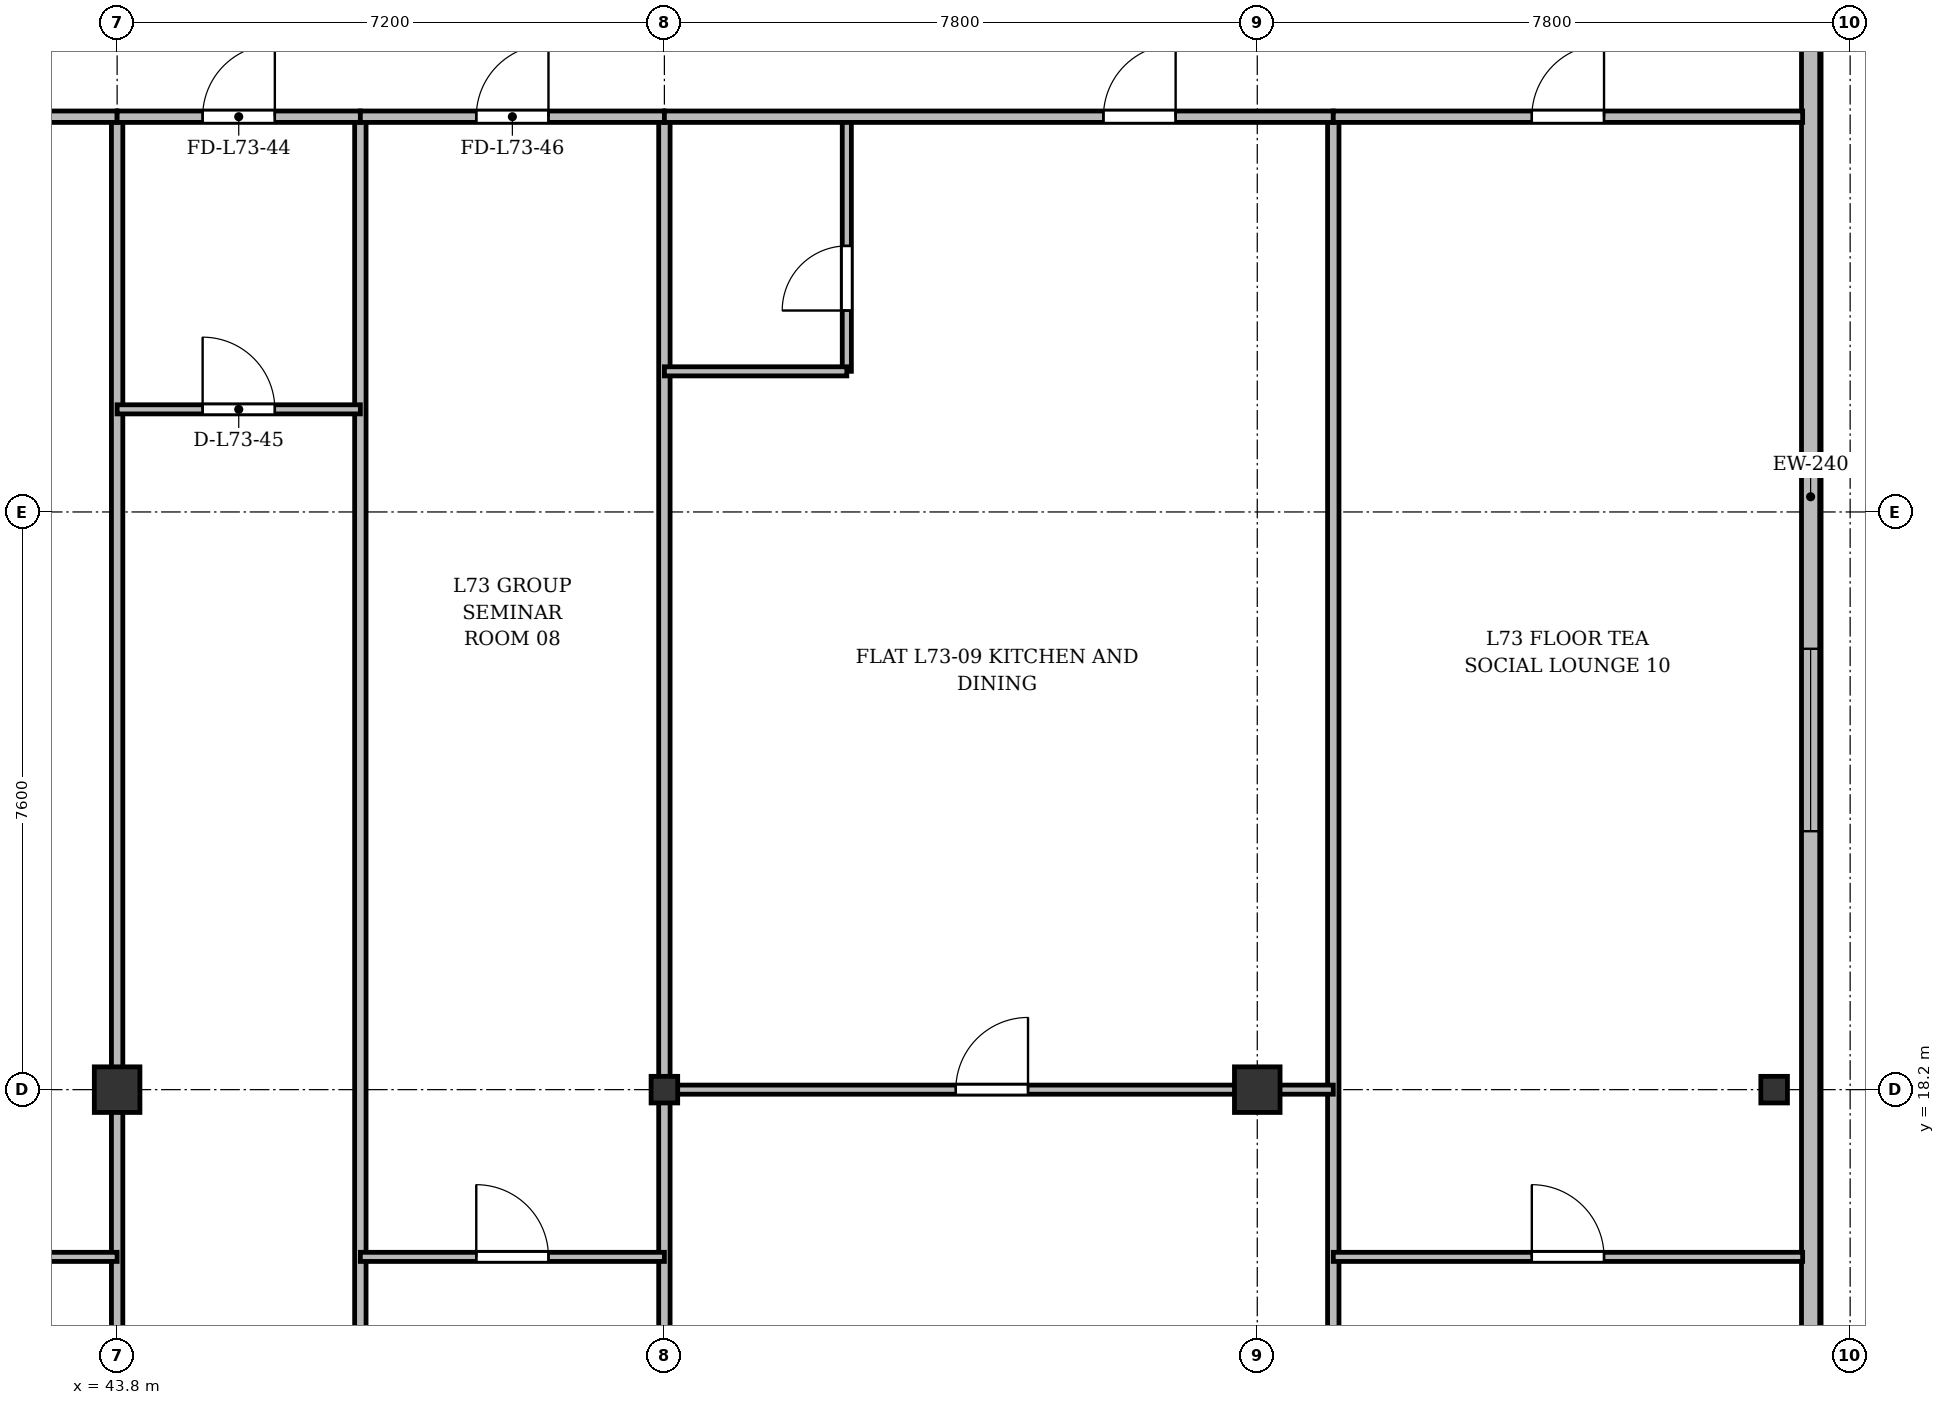
"""IFC4 building model, lengths in metres.
Left out: names, types, materials, properties, quantities, classifications, styles, units other than length and angle.
Written with IfcOpenShell. Run it as: python <this file> out.ifc"""

import sys

from ifc_helpers import new_model, si_unit, direction, frame, frame_2d, origin, origin_2d, place, context, subcontext, project, spatial, rectangle, i_section, extrude, source, transform, mapped, element, fill, save


model = new_model("IFC4")
c1 = context("Model", 3, precision=1e-05, world=origin(), true_north=direction((0.0, 1.0)))
c2 = subcontext(c1, "Body", "Model", "MODEL_VIEW")
j1 = project(units=[si_unit("LENGTHUNIT", "METRE"), si_unit("PLANEANGLEUNIT", "RADIAN")], contexts=[c1])
p1 = place(None, origin())
s1 = spatial("IfcSite", under=j1, at=p1, CompositionType="ELEMENT")
p2 = place(p1, origin())
s2 = spatial("IfcBuilding", under=s1, at=p2, CompositionType="ELEMENT")
p3 = place(p2, frame((0.0, 0.0, 281.1)))
s3 = spatial("IfcBuildingStorey", under=s2, at=p3, CompositionType="ELEMENT", Elevation=281.1)
m1 = source(origin(), c2, "Body", "SweptSolid", [
    extrude(rectangle(XDim=0.6, YDim=0.6, at=origin_2d()), origin(), (0.0, 0.0, 1.0), 3.6),
])
p4 = place(p3, frame((43.8, 18.2, 0.0), z_axis=(0.0, 0.0, 1.0), x_axis=(1.0, 0.0, 0.0)))
e1 = element("IfcColumn", 1, at=p4, inside=s3, PredefinedType="COLUMN", context=c2, shape_type="MappedRepresentation", body=[
    mapped(m1, transform((0.0, 0.0, 0.0), x_axis=(1.0, 0.0, 0.0), y_axis=(0.0, 1.0, 0.0), z_axis=(0.0, 0.0, 1.0), scale=1.0)),
])
m2 = source(origin(), c2, "Body", "SweptSolid", [
    extrude(i_section(OverallWidth=0.35, OverallDepth=0.35, WebThickness=0.018, FlangeThickness=0.028, at=origin_2d()), origin(), (0.0, 0.0, 1.0), 3.6),
])
p5 = place(p3, frame((51.0, 18.2, 0.0), z_axis=(0.0, 0.0, 1.0), x_axis=(1.0, 0.0, 0.0)))
e2 = element("IfcColumn", 2, at=p5, inside=s3, PredefinedType="COLUMN", context=c2, shape_type="MappedRepresentation", body=[
    mapped(m2, transform((0.0, 0.0, 0.0), x_axis=(1.0, 0.0, 0.0), y_axis=(0.0, 1.0, 0.0), z_axis=(0.0, 0.0, 1.0), scale=1.0)),
])
p6 = place(p3, frame((58.8, 18.2, 0.0), z_axis=(0.0, 0.0, 1.0), x_axis=(1.0, 0.0, 0.0)))
e3 = element("IfcColumn", 3, at=p6, inside=s3, PredefinedType="COLUMN", context=c2, shape_type="MappedRepresentation", body=[
    mapped(m1, transform((0.0, 0.0, 0.0), x_axis=(1.0, 0.0, 0.0), y_axis=(0.0, 1.0, 0.0), z_axis=(0.0, 0.0, 1.0), scale=1.0)),
])
p7 = place(p3, frame((65.6, 18.2, 0.0), z_axis=(0.0, 0.0, 1.0), x_axis=(1.0, 0.0, 0.0)))
e4 = element("IfcColumn", 4, at=p7, inside=s3, PredefinedType="COLUMN", context=c2, shape_type="MappedRepresentation", body=[
    mapped(m2, transform((0.0, 0.0, 0.0), x_axis=(1.0, 0.0, 0.0), y_axis=(0.0, 1.0, 0.0), z_axis=(0.0, 0.0, 1.0), scale=1.0)),
])
p8 = place(p3, frame((66.08, 45.5, 0.0), z_axis=(0.0, 0.0, 1.0), x_axis=(0.0, -1.0, 0.0)))
e5 = element("IfcWall", 5, at=p8, inside=s3, PredefinedType="SOLIDWALL", context=c2, shape_type="SweptSolid", body=[
    extrude(rectangle(XDim=39.0, YDim=0.24, at=frame_2d((19.5, 0.0))), origin(), (0.0, 0.0, 1.0), 3.37),
])
p9 = place(p8, frame((36.35, 0.0, 0.92)))
e6 = element("IfcOpeningElement", 6, at=p9, cuts=e5, PredefinedType="OPENING", context=c2, shape_type="SweptSolid", body=[
    extrude(rectangle(XDim=1.2, YDim=1.65, at=frame_2d((0.6, 0.825))), frame((0.0, 0.13, 0.0), z_axis=(0.0, -1.0, 0.0), x_axis=(1.0, 0.0, 0.0)), (0.0, 0.0, 1.0), 0.26),
])
p10 = place(p8, frame((32.9, 0.0, 0.92)))
e7 = element("IfcOpeningElement", 7, at=p10, cuts=e5, PredefinedType="OPENING", context=c2, shape_type="SweptSolid", body=[
    extrude(rectangle(XDim=2.4, YDim=2.1, at=frame_2d((1.2, 1.05))), frame((0.0, 0.13, 0.0), z_axis=(0.0, -1.0, 0.0), x_axis=(1.0, 0.0, 0.0)), (0.0, 0.0, 1.0), 0.26),
])
p11 = place(p8, frame((21.5, 0.0, 0.92)))
e8 = element("IfcOpeningElement", 8, at=p11, cuts=e5, PredefinedType="OPENING", context=c2, shape_type="SweptSolid", body=[
    extrude(rectangle(XDim=2.4, YDim=2.1, at=frame_2d((1.2, 1.05))), frame((0.0, 0.13, 0.0), z_axis=(0.0, -1.0, 0.0), x_axis=(1.0, 0.0, 0.0)), (0.0, 0.0, 1.0), 0.26),
])
p12 = place(p8, frame((7.5, 0.0, 0.92)))
e9 = element("IfcOpeningElement", 9, at=p12, cuts=e5, PredefinedType="OPENING", context=c2, shape_type="SweptSolid", body=[
    extrude(rectangle(XDim=2.4, YDim=2.1, at=frame_2d((1.2, 1.05))), frame((0.0, 0.13, 0.0), z_axis=(0.0, -1.0, 0.0), x_axis=(1.0, 0.0, 0.0)), (0.0, 0.0, 1.0), 0.26),
])
p13 = place(p8, frame((1.15, 0.0, 0.92)))
e10 = element("IfcOpeningElement", 10, at=p13, cuts=e5, PredefinedType="OPENING", context=c2, shape_type="SweptSolid", body=[
    extrude(rectangle(XDim=1.2, YDim=1.65, at=frame_2d((0.6, 0.825))), frame((0.0, 0.13, 0.0), z_axis=(0.0, -1.0, 0.0), x_axis=(1.0, 0.0, 0.0)), (0.0, 0.0, 1.0), 0.26),
])
p14 = place(p3, frame((43.8, 3.725, 0.0), z_axis=(0.0, 0.0, 1.0), x_axis=(0.0, 1.0, 0.0)))
e11 = element("IfcWall", 11, at=p14, inside=s3, PredefinedType="PARTITIONING", context=c2, shape_type="SweptSolid", body=[
    extrude(rectangle(XDim=27.275, YDim=0.15, at=frame_2d((13.637, 0.0))), origin(), (0.0, 0.0, 1.0), 2.87),
])
p15 = place(p3, frame((47.0, 3.725, 0.0), z_axis=(0.0, 0.0, 1.0), x_axis=(0.0, 1.0, 0.0)))
e12 = element("IfcWall", 12, at=p15, inside=s3, PredefinedType="PARTITIONING", context=c2, shape_type="SweptSolid", body=[
    extrude(rectangle(XDim=27.275, YDim=0.15, at=frame_2d((13.637, 0.0))), origin(), (0.0, 0.0, 1.0), 2.92),
])
p16 = place(p3, frame((51.0, 3.725, 0.0), z_axis=(0.0, 0.0, 1.0), x_axis=(0.0, 1.0, 0.0)))
e13 = element("IfcWall", 13, at=p16, inside=s3, PredefinedType="PARTITIONING", context=c2, shape_type="SweptSolid", body=[
    extrude(rectangle(XDim=27.275, YDim=0.15, at=frame_2d((13.637, 0.0))), origin(), (0.0, 0.0, 1.0), 2.87),
])
p17 = place(p3, frame((59.8, 3.725, 0.0), z_axis=(0.0, 0.0, 1.0), x_axis=(0.0, 1.0, 0.0)))
e14 = element("IfcWall", 14, at=p17, inside=s3, PredefinedType="PARTITIONING", context=c2, shape_type="SweptSolid", body=[
    extrude(rectangle(XDim=27.275, YDim=0.15, at=frame_2d((13.637, 0.0))), origin(), (0.0, 0.0, 1.0), 2.92),
])
p18 = place(p3, frame((38.2, 31.0, 0.0), z_axis=(0.0, 0.0, 1.0), x_axis=(1.0, 0.0, 0.0)))
e15 = element("IfcWall", 15, at=p18, inside=s3, PredefinedType="PARTITIONING", context=c2, shape_type="SweptSolid", body=[
    extrude(rectangle(XDim=5.6, YDim=0.15, at=frame_2d((2.8, 0.0))), origin(), (0.0, 0.0, 1.0), 2.87),
])
p19 = place(p18, frame((2.232, 0.0, 0.0)))
e16 = element("IfcOpeningElement", 16, at=p19, cuts=e15, PredefinedType="OPENING", context=c2, shape_type="SweptSolid", body=[
    extrude(rectangle(XDim=0.95, YDim=2.15, at=frame_2d((0.475, 1.075))), frame((0.0, 0.085, 0.0), z_axis=(0.0, -1.0, 0.0), x_axis=(1.0, 0.0, 0.0)), (0.0, 0.0, 1.0), 0.17),
])
p20 = place(p3, frame((38.2, 16.0, 0.0), z_axis=(0.0, 0.0, 1.0), x_axis=(1.0, 0.0, 0.0)))
e17 = element("IfcWall", 17, at=p20, inside=s3, PredefinedType="PARTITIONING", context=c2, shape_type="SweptSolid", body=[
    extrude(rectangle(XDim=5.6, YDim=0.12, at=frame_2d((2.8, 0.0))), origin(), (0.0, 0.0, 1.0), 2.87),
])
p21 = place(p20, frame((2.232, 0.0, 0.0)))
e18 = element("IfcOpeningElement", 18, at=p21, cuts=e17, PredefinedType="OPENING", context=c2, shape_type="SweptSolid", body=[
    extrude(rectangle(XDim=0.95, YDim=2.15, at=frame_2d((0.475, 1.075))), frame((0.0, 0.07, 0.0), z_axis=(0.0, -1.0, 0.0), x_axis=(1.0, 0.0, 0.0)), (0.0, 0.0, 1.0), 0.14),
])
p22 = place(p3, frame((43.8, 31.0, 0.0), z_axis=(0.0, 0.0, 1.0), x_axis=(1.0, 0.0, 0.0)))
e19 = element("IfcWall", 19, at=p22, inside=s3, PredefinedType="PARTITIONING", context=c2, shape_type="SweptSolid", body=[
    extrude(rectangle(XDim=3.2, YDim=0.15, at=frame_2d((1.6, 0.0))), origin(), (0.0, 0.0, 1.0), 2.87),
])
p23 = place(p22, frame((1.125, 0.0, 0.0)))
e20 = element("IfcOpeningElement", 20, at=p23, cuts=e19, PredefinedType="OPENING", context=c2, shape_type="SweptSolid", body=[
    extrude(rectangle(XDim=0.95, YDim=2.15, at=frame_2d((0.475, 1.075))), frame((0.0, 0.085, 0.0), z_axis=(0.0, -1.0, 0.0), x_axis=(1.0, 0.0, 0.0)), (0.0, 0.0, 1.0), 0.17),
])
p24 = place(p3, frame((43.8, 27.15, 0.0), z_axis=(0.0, 0.0, 1.0), x_axis=(1.0, 0.0, 0.0)))
e21 = element("IfcWall", 21, at=p24, inside=s3, PredefinedType="PARTITIONING", context=c2, shape_type="SweptSolid", body=[
    extrude(rectangle(XDim=3.2, YDim=0.12, at=frame_2d((1.6, 0.0))), origin(), (0.0, 0.0, 1.0), 2.87),
])
p25 = place(p24, frame((1.125, 0.0, 0.0)))
e22 = element("IfcOpeningElement", 22, at=p25, cuts=e21, PredefinedType="OPENING", context=c2, shape_type="SweptSolid", body=[
    extrude(rectangle(XDim=0.95, YDim=2.15, at=frame_2d((0.475, 1.075))), frame((0.0, 0.07, 0.0), z_axis=(0.0, -1.0, 0.0), x_axis=(1.0, 0.0, 0.0)), (0.0, 0.0, 1.0), 0.14),
])
p26 = place(p3, frame((47.0, 31.0, 0.0), z_axis=(0.0, 0.0, 1.0), x_axis=(1.0, 0.0, 0.0)))
e23 = element("IfcWall", 23, at=p26, inside=s3, PredefinedType="PARTITIONING", context=c2, shape_type="SweptSolid", body=[
    extrude(rectangle(XDim=4.0, YDim=0.15, at=frame_2d((2.0, 0.0))), origin(), (0.0, 0.0, 1.0), 2.87),
])
p27 = place(p26, frame((1.525, 0.0, 0.0)))
e24 = element("IfcOpeningElement", 24, at=p27, cuts=e23, PredefinedType="OPENING", context=c2, shape_type="SweptSolid", body=[
    extrude(rectangle(XDim=0.95, YDim=2.15, at=frame_2d((0.475, 1.075))), frame((0.0, 0.085, 0.0), z_axis=(0.0, -1.0, 0.0), x_axis=(1.0, 0.0, 0.0)), (0.0, 0.0, 1.0), 0.17),
])
p28 = place(p3, frame((47.0, 16.0, 0.0), z_axis=(0.0, 0.0, 1.0), x_axis=(1.0, 0.0, 0.0)))
e25 = element("IfcWall", 25, at=p28, inside=s3, PredefinedType="PARTITIONING", context=c2, shape_type="SweptSolid", body=[
    extrude(rectangle(XDim=4.0, YDim=0.12, at=frame_2d((2.0, 0.0))), origin(), (0.0, 0.0, 1.0), 2.87),
])
p29 = place(p28, frame((1.525, 0.0, 0.0)))
e26 = element("IfcOpeningElement", 26, at=p29, cuts=e25, PredefinedType="OPENING", context=c2, shape_type="SweptSolid", body=[
    extrude(rectangle(XDim=0.95, YDim=2.15, at=frame_2d((0.475, 1.075))), frame((0.0, 0.07, 0.0), z_axis=(0.0, -1.0, 0.0), x_axis=(1.0, 0.0, 0.0)), (0.0, 0.0, 1.0), 0.14),
])
p30 = place(p3, frame((51.0, 18.2, 0.0), z_axis=(0.0, 0.0, 1.0), x_axis=(1.0, 0.0, 0.0)))
e27 = element("IfcWall", 27, at=p30, inside=s3, PredefinedType="PARTITIONING", context=c2, shape_type="SweptSolid", body=[
    extrude(rectangle(XDim=8.8, YDim=0.12, at=frame_2d((4.4, 0.0))), origin(), (0.0, 0.0, 1.0), 2.92),
])
p31 = place(p30, frame((3.834, 0.0, 0.0)))
e28 = element("IfcOpeningElement", 28, at=p31, cuts=e27, PredefinedType="OPENING", context=c2, shape_type="SweptSolid", body=[
    extrude(rectangle(XDim=0.95, YDim=2.15, at=frame_2d((0.475, 1.075))), frame((0.0, 0.07, 0.0), z_axis=(0.0, -1.0, 0.0), x_axis=(1.0, 0.0, 0.0)), (0.0, 0.0, 1.0), 0.14),
])
p32 = place(p3, frame((53.4, 27.65, 0.0), z_axis=(0.0, 0.0, 1.0), x_axis=(0.0, 1.0, 0.0)))
e29 = element("IfcWall", 29, at=p32, inside=s3, PredefinedType="PARTITIONING", context=c2, shape_type="SweptSolid", body=[
    extrude(rectangle(XDim=3.35, YDim=0.12, at=frame_2d((1.675, 0.0))), origin(), (0.0, 0.0, 1.0), 3.37),
])
p33 = place(p32, frame((0.8, 0.0, 0.0)))
e30 = element("IfcOpeningElement", 30, at=p33, cuts=e29, PredefinedType="OPENING", context=c2, shape_type="SweptSolid", body=[
    extrude(rectangle(XDim=0.85, YDim=2.1, at=frame_2d((0.425, 1.05))), frame((0.0, 0.07, 0.0), z_axis=(0.0, -1.0, 0.0), x_axis=(1.0, 0.0, 0.0)), (0.0, 0.0, 1.0), 0.14),
])
p34 = place(p3, frame((51.0, 27.65, 0.0), z_axis=(0.0, 0.0, 1.0), x_axis=(1.0, 0.0, 0.0)))
e31 = element("IfcWall", 31, at=p34, inside=s3, PredefinedType="PARTITIONING", context=c2, shape_type="SweptSolid", body=[
    extrude(rectangle(XDim=2.4, YDim=0.12, at=frame_2d((1.2, 0.0))), origin(), (0.0, 0.0, 1.0), 2.87),
])
p35 = place(p3, frame((51.0, 31.0, 0.0), z_axis=(0.0, 0.0, 1.0), x_axis=(1.0, 0.0, 0.0)))
e32 = element("IfcWall", 32, at=p35, inside=s3, PredefinedType="PARTITIONING", context=c2, shape_type="SweptSolid", body=[
    extrude(rectangle(XDim=8.8, YDim=0.15, at=frame_2d((4.4, 0.0))), origin(), (0.0, 0.0, 1.0), 2.87),
])
p36 = place(p35, frame((5.776, 0.0, 0.0)))
e33 = element("IfcOpeningElement", 33, at=p36, cuts=e32, PredefinedType="OPENING", context=c2, shape_type="SweptSolid", body=[
    extrude(rectangle(XDim=0.95, YDim=2.15, at=frame_2d((0.475, 1.075))), frame((0.0, 0.085, 0.0), z_axis=(0.0, -1.0, 0.0), x_axis=(1.0, 0.0, 0.0)), (0.0, 0.0, 1.0), 0.17),
])
p37 = place(p3, frame((59.8, 31.0, 0.0), z_axis=(0.0, 0.0, 1.0), x_axis=(1.0, 0.0, 0.0)))
e34 = element("IfcWall", 34, at=p37, inside=s3, PredefinedType="PARTITIONING", context=c2, shape_type="SweptSolid", body=[
    extrude(rectangle(XDim=6.175, YDim=0.15, at=frame_2d((3.087, 0.0))), origin(), (0.0, 0.0, 1.0), 2.87),
])
p38 = place(p37, frame((2.612, 0.0, 0.0)))
e35 = element("IfcOpeningElement", 35, at=p38, cuts=e34, PredefinedType="OPENING", context=c2, shape_type="SweptSolid", body=[
    extrude(rectangle(XDim=0.95, YDim=2.15, at=frame_2d((0.475, 1.075))), frame((0.0, 0.085, 0.0), z_axis=(0.0, -1.0, 0.0), x_axis=(1.0, 0.0, 0.0)), (0.0, 0.0, 1.0), 0.17),
])
p39 = place(p3, frame((59.8, 16.0, 0.0), z_axis=(0.0, 0.0, 1.0), x_axis=(1.0, 0.0, 0.0)))
e36 = element("IfcWall", 36, at=p39, inside=s3, PredefinedType="PARTITIONING", context=c2, shape_type="SweptSolid", body=[
    extrude(rectangle(XDim=6.175, YDim=0.12, at=frame_2d((3.087, 0.0))), origin(), (0.0, 0.0, 1.0), 2.87),
])
p40 = place(p39, frame((2.612, 0.0, 0.0)))
e37 = element("IfcOpeningElement", 37, at=p40, cuts=e36, PredefinedType="OPENING", context=c2, shape_type="SweptSolid", body=[
    extrude(rectangle(XDim=0.95, YDim=2.15, at=frame_2d((0.475, 1.075))), frame((0.0, 0.07, 0.0), z_axis=(0.0, -1.0, 0.0), x_axis=(1.0, 0.0, 0.0)), (0.0, 0.0, 1.0), 0.14),
])
m3 = source(origin(), c2, "Body", "SweptSolid", [
    extrude(rectangle(XDim=2.4, YDim=2.1, at=frame_2d((1.2, 1.05))), frame((0.0, 0.03, 0.0), z_axis=(0.0, -1.0, 0.0), x_axis=(1.0, 0.0, 0.0)), (0.0, 0.0, 1.0), 0.06),
])
p41 = place(p11, origin())
e38 = element("IfcWindow", 38, at=p41, inside=s3, PartitioningType="SINGLE_PANEL", PredefinedType="WINDOW", context=c2, shape_type="MappedRepresentation", body=[
    mapped(m3, transform((0.0, 0.0, 0.0), x_axis=(1.0, 0.0, 0.0), y_axis=(0.0, 1.0, 0.0), z_axis=(0.0, 0.0, 1.0), scale=1.0)),
])
fill(e8, e38)
m4 = source(origin(), c2, "Body", "SweptSolid", [
    extrude(rectangle(XDim=0.95, YDim=2.15, at=frame_2d((0.475, 1.075))), frame((0.0, 0.025, 0.0), z_axis=(0.0, -1.0, 0.0), x_axis=(1.0, 0.0, 0.0)), (0.0, 0.0, 1.0), 0.05),
])
p42 = place(p23, origin())
e39 = element("IfcDoor", 39, at=p42, inside=s3, OperationType="SINGLE_SWING_RIGHT", PredefinedType="DOOR", context=c2, shape_type="MappedRepresentation", body=[
    mapped(m4, transform((0.0, 0.0, 0.0), x_axis=(1.0, 0.0, 0.0), y_axis=(0.0, 1.0, 0.0), z_axis=(0.0, 0.0, 1.0), scale=1.0)),
])
fill(e20, e39)
p43 = place(p25, origin())
e40 = element("IfcDoor", 40, at=p43, inside=s3, OperationType="SINGLE_SWING_LEFT", PredefinedType="DOOR", context=c2, shape_type="MappedRepresentation", body=[
    mapped(m4, transform((0.0, 0.0, 0.0), x_axis=(1.0, 0.0, 0.0), y_axis=(0.0, 1.0, 0.0), z_axis=(0.0, 0.0, 1.0), scale=1.0)),
])
fill(e22, e40)
p44 = place(p27, origin())
e41 = element("IfcDoor", 41, at=p44, inside=s3, OperationType="SINGLE_SWING_RIGHT", PredefinedType="DOOR", context=c2, shape_type="MappedRepresentation", body=[
    mapped(m4, transform((0.0, 0.0, 0.0), x_axis=(1.0, 0.0, 0.0), y_axis=(0.0, 1.0, 0.0), z_axis=(0.0, 0.0, 1.0), scale=1.0)),
])
fill(e24, e41)
p45 = place(p29, origin())
e42 = element("IfcDoor", 42, at=p45, inside=s3, OperationType="SINGLE_SWING_LEFT", PredefinedType="DOOR", context=c2, shape_type="MappedRepresentation", body=[
    mapped(m4, transform((0.0, 0.0, 0.0), x_axis=(1.0, 0.0, 0.0), y_axis=(0.0, 1.0, 0.0), z_axis=(0.0, 0.0, 1.0), scale=1.0)),
])
fill(e26, e42)
p46 = place(p31, origin())
e43 = element("IfcDoor", 43, at=p46, inside=s3, OperationType="SINGLE_SWING_RIGHT", PredefinedType="DOOR", context=c2, shape_type="MappedRepresentation", body=[
    mapped(m4, transform((0.0, 0.0, 0.0), x_axis=(1.0, 0.0, 0.0), y_axis=(0.0, 1.0, 0.0), z_axis=(0.0, 0.0, 1.0), scale=1.0)),
])
fill(e28, e43)
m5 = source(origin(), c2, "Body", "SweptSolid", [
    extrude(rectangle(XDim=0.85, YDim=2.1, at=frame_2d((0.425, 1.05))), frame((0.0, 0.025, 0.0), z_axis=(0.0, -1.0, 0.0), x_axis=(1.0, 0.0, 0.0)), (0.0, 0.0, 1.0), 0.05),
])
p47 = place(p33, origin())
e44 = element("IfcDoor", 44, at=p47, inside=s3, OperationType="SINGLE_SWING_LEFT", PredefinedType="DOOR", context=c2, shape_type="MappedRepresentation", body=[
    mapped(m5, transform((0.0, 0.0, 0.0), x_axis=(1.0, 0.0, 0.0), y_axis=(0.0, 1.0, 0.0), z_axis=(0.0, 0.0, 1.0), scale=1.0)),
])
fill(e30, e44)
p48 = place(p36, origin())
e45 = element("IfcDoor", 45, at=p48, inside=s3, OperationType="SINGLE_SWING_RIGHT", PredefinedType="DOOR", context=c2, shape_type="MappedRepresentation", body=[
    mapped(m4, transform((0.0, 0.0, 0.0), x_axis=(1.0, 0.0, 0.0), y_axis=(0.0, 1.0, 0.0), z_axis=(0.0, 0.0, 1.0), scale=1.0)),
])
fill(e33, e45)
p49 = place(p38, origin())
e46 = element("IfcDoor", 46, at=p49, inside=s3, OperationType="SINGLE_SWING_RIGHT", PredefinedType="DOOR", context=c2, shape_type="MappedRepresentation", body=[
    mapped(m4, transform((0.0, 0.0, 0.0), x_axis=(1.0, 0.0, 0.0), y_axis=(0.0, 1.0, 0.0), z_axis=(0.0, 0.0, 1.0), scale=1.0)),
])
fill(e35, e46)
p50 = place(p40, origin())
e47 = element("IfcDoor", 47, at=p50, inside=s3, OperationType="SINGLE_SWING_LEFT", PredefinedType="DOOR", context=c2, shape_type="MappedRepresentation", body=[
    mapped(m4, transform((0.0, 0.0, 0.0), x_axis=(1.0, 0.0, 0.0), y_axis=(0.0, 1.0, 0.0), z_axis=(0.0, 0.0, 1.0), scale=1.0)),
])
fill(e37, e47)
save(model, sys.argv[1])
